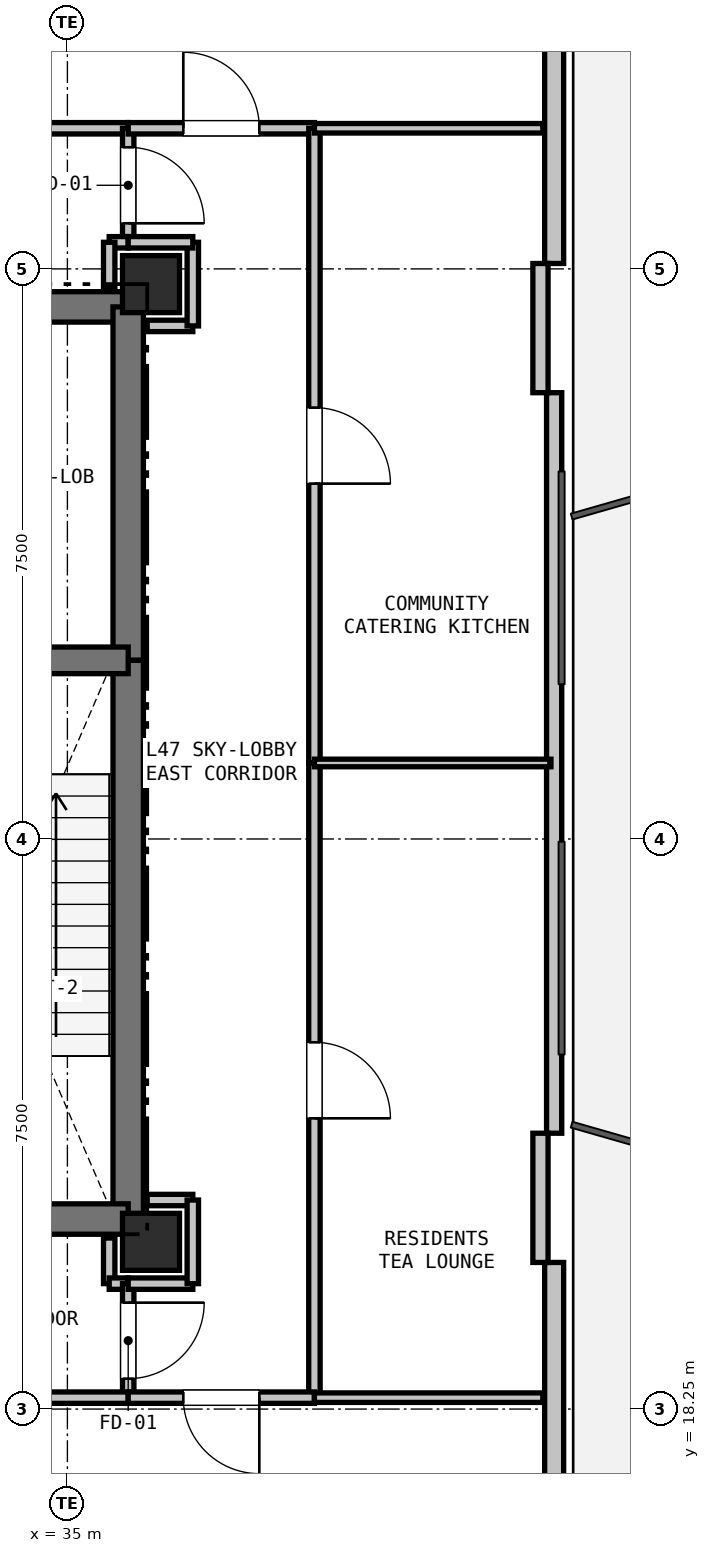
"""IFC4 building model, lengths in metres.
Left out: names, types, materials, properties, quantities, classifications, styles, units other than length and angle.
Written with IfcOpenShell. Run it as: python <this file> out.ifc"""

import sys

from ifc_helpers import new_model, si_unit, direction, frame, frame_2d, origin, origin_2d, place, context, subcontext, project, spatial, rectangle, extrude, element, fill, save


model = new_model("IFC4")
c1 = context("Model", 3, precision=1e-05, world=origin(), true_north=direction((0.0, 1.0)))
c2 = subcontext(c1, "Body", "Model", "MODEL_VIEW")
j1 = project(units=[si_unit("LENGTHUNIT", "METRE"), si_unit("PLANEANGLEUNIT", "RADIAN")], contexts=[c1])
p1 = place(None, origin())
s1 = spatial("IfcSite", under=j1, at=p1, CompositionType="ELEMENT")
p2 = place(p1, origin())
s2 = spatial("IfcBuilding", under=s1, at=p2, CompositionType="ELEMENT")
p3 = place(p2, frame((0.0, 0.0, 170.7)))
s3 = spatial("IfcBuildingStorey", under=s2, at=p3, CompositionType="ELEMENT", Elevation=170.7)
for number, where, z_axis, x_axis in (
    (1, (36.1, 33.05, 0.0), (0.0, 0.0, 1.0), (1.0, 0.0, 0.0)),
    (2, (36.1, 20.45, 0.0), (0.0, 0.0, 1.0), (1.0, 0.0, 0.0)),
):
    element("IfcColumn", number, at=place(p3, frame(where, z_axis=z_axis, x_axis=x_axis)), inside=s3, PredefinedType="COLUMN", context=c2, shape_type="SweptSolid", body=[
        extrude(rectangle(XDim=0.75, YDim=0.75, at=origin_2d()), origin(), (0.0, 0.0, 1.0), 4.8),
    ])
p4 = place(p3, frame((41.404, 43.764, 0.0), z_axis=(0.0, 0.0, 1.0), x_axis=(0.0, -1.0, 0.0)))
e3 = element("IfcWall", 3, at=p4, inside=s3, PredefinedType="SOLIDWALL", context=c2, shape_type="SweptSolid", body=[
    extrude(rectangle(XDim=10.442, YDim=0.25, at=frame_2d((5.221, 0.0))), origin(), (0.0, 0.0, 1.0), 3.205),
])
p5 = place(p4, frame((1.879, 0.0, 0.0)))
e4 = element("IfcOpeningElement", 4, at=p5, cuts=e3, PredefinedType="OPENING", context=c2, shape_type="SweptSolid", body=[
    extrude(rectangle(XDim=1.1, YDim=2.1, at=frame_2d((0.55, 1.05))), frame((0.0, 0.135, 0.0), z_axis=(0.0, -1.0, 0.0), x_axis=(1.0, 0.0, 0.0)), (0.0, 0.0, 1.0), 0.27),
])
p6 = place(p3, frame((41.404, 31.621, 0.0), z_axis=(0.0, 0.0, 1.0), x_axis=(0.0, -1.0, 0.0)))
e5 = element("IfcWall", 5, at=p6, inside=s3, PredefinedType="PARAPET", context=c2, shape_type="SweptSolid", body=[
    extrude(rectangle(XDim=9.742, YDim=0.2, at=frame_2d((4.871, 0.0))), origin(), (0.0, 0.0, 1.0), 0.2),
])
p7 = place(p3, frame((41.404, 20.179, 0.0), z_axis=(0.0, 0.0, 1.0), x_axis=(0.0, -1.0, 0.0)))
e6 = element("IfcWall", 6, at=p7, inside=s3, PredefinedType="SOLIDWALL", context=c2, shape_type="SweptSolid", body=[
    extrude(rectangle(XDim=10.442, YDim=0.25, at=frame_2d((5.221, 0.0))), origin(), (0.0, 0.0, 1.0), 3.205),
])
p8 = place(p7, frame((6.273, 0.0, 0.9)))
e7 = element("IfcOpeningElement", 7, at=p8, cuts=e6, PredefinedType="OPENING", context=c2, shape_type="SweptSolid", body=[
    extrude(rectangle(XDim=2.4, YDim=2.2, at=frame_2d((1.2, 1.1))), frame((0.0, 0.135, 0.0), z_axis=(0.0, -1.0, 0.0), x_axis=(1.0, 0.0, 0.0)), (0.0, 0.0, 1.0), 0.27),
])
for number, where, z_axis, x_axis in (
    (8, (41.224, 33.321, 0.0), (0.0, 0.0, 1.0), (0.0, -1.0, 0.0)),
    (9, (41.224, 21.879, 0.0), (0.0, 0.0, 1.0), (0.0, -1.0, 0.0)),
):
    element("IfcWall", number, at=place(p3, frame(where, z_axis=z_axis, x_axis=x_axis)), inside=s3, PredefinedType="PARAPET", context=c2, shape_type="SweptSolid", body=[
        extrude(rectangle(XDim=1.7, YDim=0.2, at=frame_2d((0.85, 0.0))), origin(), (0.0, 0.0, 1.0), 4.19),
    ])
p9 = place(p3, frame((32.35, 32.75, 0.0), z_axis=(0.0, 0.0, 1.0), x_axis=(1.0, 0.0, 0.0)))
e10 = element("IfcWall", 10, at=p9, inside=s3, PredefinedType="SHEAR", context=c2, shape_type="SweptSolid", body=[
    extrude(rectangle(XDim=3.45, YDim=0.4, at=frame_2d((1.725, 0.0))), origin(), (0.0, 0.0, 1.0), 4.57),
])
p10 = place(p9, frame((0.65, 0.0, 0.0)))
e11 = element("IfcOpeningElement", 11, at=p10, cuts=e10, PredefinedType="OPENING", context=c2, shape_type="SweptSolid", body=[
    extrude(rectangle(XDim=1.15, YDim=2.15, at=frame_2d((0.575, 1.075))), frame((0.0, 0.21, 0.0), z_axis=(0.0, -1.0, 0.0), x_axis=(1.0, 0.0, 0.0)), (0.0, 0.0, 1.0), 0.42),
])
p11 = place(p3, frame((35.8, 32.75, 0.0), z_axis=(0.0, 0.0, 1.0), x_axis=(0.0, -1.0, 0.0)))
e12 = element("IfcWall", 12, at=p11, inside=s3, PredefinedType="SHEAR", context=c2, shape_type="SweptSolid", body=[
    extrude(rectangle(XDim=4.65, YDim=0.4, at=frame_2d((2.325, 0.0))), origin(), (0.0, 0.0, 1.0), 4.57),
])
p12 = place(p3, frame((35.8, 28.1, 0.0), z_axis=(0.0, 0.0, 1.0), x_axis=(0.0, -1.0, 0.0)))
e13 = element("IfcWall", 13, at=p12, inside=s3, PredefinedType="SHEAR", context=c2, shape_type="SweptSolid", body=[
    extrude(rectangle(XDim=7.35, YDim=0.4, at=frame_2d((3.675, 0.0))), origin(), (0.0, 0.0, 1.0), 4.57),
])
p13 = place(p3, frame((35.8, 20.75, 0.0), z_axis=(0.0, 0.0, 1.0), x_axis=(-1.0, 0.0, 0.0)))
e14 = element("IfcWall", 14, at=p13, inside=s3, PredefinedType="SHEAR", context=c2, shape_type="SweptSolid", body=[
    extrude(rectangle(XDim=3.45, YDim=0.4, at=frame_2d((1.725, 0.0))), origin(), (0.0, 0.0, 1.0), 4.57),
])
p14 = place(p3, frame((32.35, 28.1, 0.0), z_axis=(0.0, 0.0, 1.0), x_axis=(1.0, 0.0, 0.0)))
e15 = element("IfcWall", 15, at=p14, inside=s3, PredefinedType="SHEAR", context=c2, shape_type="SweptSolid", body=[
    extrude(rectangle(XDim=3.45, YDim=0.35, at=frame_2d((1.725, 0.0))), origin(), (0.0, 0.0, 1.0), 4.57),
])
p15 = place(p14, frame((1.15, 0.0, 0.0)))
e16 = element("IfcOpeningElement", 16, at=p15, cuts=e15, PredefinedType="OPENING", context=c2, shape_type="SweptSolid", body=[
    extrude(rectangle(XDim=1.15, YDim=2.15, at=frame_2d((0.575, 1.075))), frame((0.0, 0.185, 0.0), z_axis=(0.0, -1.0, 0.0), x_axis=(1.0, 0.0, 0.0)), (0.0, 0.0, 1.0), 0.37),
])
p16 = place(p3, frame((35.55, 20.5, 0.0), z_axis=(0.0, 0.0, 1.0), x_axis=(0.0, -1.0, 0.0)))
e17 = element("IfcWall", 17, at=p16, inside=s3, PredefinedType="PARTITIONING", context=c2, shape_type="SweptSolid", body=[
    extrude(rectangle(XDim=0.6, YDim=0.15, at=frame_2d((0.3, 0.0))), origin(), (0.0, 0.0, 1.0), 4.095),
])
p17 = place(p3, frame((35.55, 19.9, 0.0), z_axis=(0.0, 0.0, 1.0), x_axis=(1.0, 0.0, 0.0)))
e18 = element("IfcWall", 18, at=p17, inside=s3, PredefinedType="PARTITIONING", context=c2, shape_type="SweptSolid", body=[
    extrude(rectangle(XDim=0.25, YDim=0.15, at=frame_2d((0.125, 0.0))), origin(), (0.0, 0.0, 1.0), 4.57),
])
p18 = place(p3, frame((35.8, 19.9, 0.0), z_axis=(0.0, 0.0, 1.0), x_axis=(0.0, -1.0, 0.0)))
e19 = element("IfcWall", 19, at=p18, inside=s3, PredefinedType="PARTITIONING", context=c2, shape_type="SweptSolid", body=[
    extrude(rectangle(XDim=1.5, YDim=0.15, at=frame_2d((0.75, 0.0))), origin(), (0.0, 0.0, 1.0), 3.205),
])
p19 = place(p18, frame((0.25, 0.0, 0.0)))
e20 = element("IfcOpeningElement", 20, at=p19, cuts=e19, PredefinedType="OPENING", context=c2, shape_type="SweptSolid", body=[
    extrude(rectangle(XDim=1.0, YDim=2.15, at=frame_2d((0.5, 1.075))), frame((0.0, 0.085, 0.0), z_axis=(0.0, -1.0, 0.0), x_axis=(1.0, 0.0, 0.0)), (0.0, 0.0, 1.0), 0.17),
])
p20 = place(p3, frame((35.8, 18.4, 0.0), z_axis=(0.0, 0.0, 1.0), x_axis=(-1.0, 0.0, 0.0)))
e21 = element("IfcWall", 21, at=p20, inside=s3, PredefinedType="PARTITIONING", context=c2, shape_type="SweptSolid", body=[
    extrude(rectangle(XDim=8.8, YDim=0.15, at=frame_2d((4.4, 0.0))), origin(), (0.0, 0.0, 1.0), 3.205),
])
p21 = place(p20, frame((3.9, 0.0, 0.0)))
e22 = element("IfcOpeningElement", 22, at=p21, cuts=e21, PredefinedType="OPENING", context=c2, shape_type="SweptSolid", body=[
    extrude(rectangle(XDim=1.0, YDim=2.15, at=frame_2d((0.5, 1.075))), frame((0.0, 0.085, 0.0), z_axis=(0.0, -1.0, 0.0), x_axis=(1.0, 0.0, 0.0)), (0.0, 0.0, 1.0), 0.17),
])
p22 = place(p3, frame((29.5, 35.1, 0.0), z_axis=(0.0, 0.0, 1.0), x_axis=(1.0, 0.0, 0.0)))
e23 = element("IfcWall", 23, at=p22, inside=s3, PredefinedType="PARTITIONING", context=c2, shape_type="SweptSolid", body=[
    extrude(rectangle(XDim=6.3, YDim=0.15, at=frame_2d((3.15, 0.0))), origin(), (0.0, 0.0, 1.0), 3.205),
])
p23 = place(p22, frame((2.25, 0.0, 0.0)))
e24 = element("IfcOpeningElement", 24, at=p23, cuts=e23, PredefinedType="OPENING", context=c2, shape_type="SweptSolid", body=[
    extrude(rectangle(XDim=1.8, YDim=2.2, at=frame_2d((0.9, 1.1))), frame((0.0, 0.085, 0.0), z_axis=(0.0, -1.0, 0.0), x_axis=(1.0, 0.0, 0.0)), (0.0, 0.0, 1.0), 0.17),
])
p24 = place(p3, frame((35.8, 35.1, 0.0), z_axis=(0.0, 0.0, 1.0), x_axis=(0.0, -1.0, 0.0)))
e25 = element("IfcWall", 25, at=p24, inside=s3, PredefinedType="PARTITIONING", context=c2, shape_type="SweptSolid", body=[
    extrude(rectangle(XDim=1.5, YDim=0.15, at=frame_2d((0.75, 0.0))), origin(), (0.0, 0.0, 1.0), 3.205),
])
p25 = place(p24, frame((0.25, 0.0, 0.0)))
e26 = element("IfcOpeningElement", 26, at=p25, cuts=e25, PredefinedType="OPENING", context=c2, shape_type="SweptSolid", body=[
    extrude(rectangle(XDim=1.0, YDim=2.15, at=frame_2d((0.5, 1.075))), frame((0.0, 0.085, 0.0), z_axis=(0.0, -1.0, 0.0), x_axis=(1.0, 0.0, 0.0)), (0.0, 0.0, 1.0), 0.17),
])
p26 = place(p3, frame((35.8, 33.6, 0.0), z_axis=(0.0, 0.0, 1.0), x_axis=(-1.0, 0.0, 0.0)))
e27 = element("IfcWall", 27, at=p26, inside=s3, PredefinedType="PARTITIONING", context=c2, shape_type="SweptSolid", body=[
    extrude(rectangle(XDim=0.25, YDim=0.15, at=frame_2d((0.125, 0.0))), origin(), (0.0, 0.0, 1.0), 3.205),
])
p27 = place(p3, frame((35.55, 33.6, 0.0), z_axis=(0.0, 0.0, 1.0), x_axis=(0.0, -1.0, 0.0)))
e28 = element("IfcWall", 28, at=p27, inside=s3, PredefinedType="PARTITIONING", context=c2, shape_type="SweptSolid", body=[
    extrude(rectangle(XDim=0.6, YDim=0.15, at=frame_2d((0.3, 0.0))), origin(), (0.0, 0.0, 1.0), 3.205),
])
for number, where, z_axis, x_axis in (
    (29, (36.65, 21.0, 0.0), (0.0, 0.0, 1.0), (-1.0, 0.0, 0.0)),
    (30, (36.05, 32.5, 0.0), (0.0, 0.0, 1.0), (1.0, 0.0, 0.0)),
):
    element("IfcWall", number, at=place(p3, frame(where, z_axis=z_axis, x_axis=x_axis)), inside=s3, PredefinedType="PARTITIONING", context=c2, shape_type="SweptSolid", body=[
        extrude(rectangle(XDim=0.6, YDim=0.15, at=frame_2d((0.3, 0.0))), origin(), (0.0, 0.0, 1.0), 4.095),
    ])
p28 = place(p3, frame((36.65, 32.5, 0.0), z_axis=(0.0, 0.0, 1.0), x_axis=(0.0, 1.0, 0.0)))
e31 = element("IfcWall", 31, at=p28, inside=s3, PredefinedType="PARTITIONING", context=c2, shape_type="SweptSolid", body=[
    extrude(rectangle(XDim=1.1, YDim=0.15, at=frame_2d((0.55, 0.0))), origin(), (0.0, 0.0, 1.0), 3.205),
])
p29 = place(p3, frame((36.65, 33.6, 0.0), z_axis=(0.0, 0.0, 1.0), x_axis=(-1.0, 0.0, 0.0)))
e32 = element("IfcWall", 32, at=p29, inside=s3, PredefinedType="PARTITIONING", context=c2, shape_type="SweptSolid", body=[
    extrude(rectangle(XDim=0.85, YDim=0.15, at=frame_2d((0.425, 0.0))), origin(), (0.0, 0.0, 1.0), 3.205),
])
p30 = place(p3, frame((35.8, 35.1, 0.0), z_axis=(0.0, 0.0, 1.0), x_axis=(1.0, 0.0, 0.0)))
e33 = element("IfcWall", 33, at=p30, inside=s3, PredefinedType="PARTITIONING", context=c2, shape_type="SweptSolid", body=[
    extrude(rectangle(XDim=2.45, YDim=0.15, at=frame_2d((1.225, 0.0))), origin(), (0.0, 0.0, 1.0), 3.205),
])
p31 = place(p30, frame((0.725, 0.0, 0.0)))
e34 = element("IfcOpeningElement", 34, at=p31, cuts=e33, PredefinedType="OPENING", context=c2, shape_type="SweptSolid", body=[
    extrude(rectangle(XDim=1.0, YDim=2.15, at=frame_2d((0.5, 1.075))), frame((0.0, 0.085, 0.0), z_axis=(0.0, -1.0, 0.0), x_axis=(1.0, 0.0, 0.0)), (0.0, 0.0, 1.0), 0.17),
])
p32 = place(p3, frame((38.25, 35.1, 0.0), z_axis=(0.0, 0.0, 1.0), x_axis=(0.0, -1.0, 0.0)))
e35 = element("IfcWall", 35, at=p32, inside=s3, PredefinedType="PARTITIONING", context=c2, shape_type="SweptSolid", body=[
    extrude(rectangle(XDim=8.35, YDim=0.15, at=frame_2d((4.175, 0.0))), origin(), (0.0, 0.0, 1.0), 3.205),
])
p33 = place(p32, frame((3.675, 0.0, 0.0)))
e36 = element("IfcOpeningElement", 36, at=p33, cuts=e35, PredefinedType="OPENING", context=c2, shape_type="SweptSolid", body=[
    extrude(rectangle(XDim=1.0, YDim=2.15, at=frame_2d((0.5, 1.075))), frame((0.0, 0.085, 0.0), z_axis=(0.0, -1.0, 0.0), x_axis=(1.0, 0.0, 0.0)), (0.0, 0.0, 1.0), 0.17),
])
p34 = place(p3, frame((38.25, 26.75, 0.0), z_axis=(0.0, 0.0, 1.0), x_axis=(0.0, -1.0, 0.0)))
e37 = element("IfcWall", 37, at=p34, inside=s3, PredefinedType="PARTITIONING", context=c2, shape_type="SweptSolid", body=[
    extrude(rectangle(XDim=8.35, YDim=0.15, at=frame_2d((4.175, 0.0))), origin(), (0.0, 0.0, 1.0), 4.57),
])
p35 = place(p34, frame((3.675, 0.0, 0.0)))
e38 = element("IfcOpeningElement", 38, at=p35, cuts=e37, PredefinedType="OPENING", context=c2, shape_type="SweptSolid", body=[
    extrude(rectangle(XDim=1.0, YDim=2.15, at=frame_2d((0.5, 1.075))), frame((0.0, 0.085, 0.0), z_axis=(0.0, -1.0, 0.0), x_axis=(1.0, 0.0, 0.0)), (0.0, 0.0, 1.0), 0.17),
])
p36 = place(p3, frame((38.25, 18.4, 0.0), z_axis=(0.0, 0.0, 1.0), x_axis=(-1.0, 0.0, 0.0)))
e39 = element("IfcWall", 39, at=p36, inside=s3, PredefinedType="PARTITIONING", context=c2, shape_type="SweptSolid", body=[
    extrude(rectangle(XDim=2.45, YDim=0.15, at=frame_2d((1.225, 0.0))), origin(), (0.0, 0.0, 1.0), 3.205),
])
p37 = place(p36, frame((0.725, 0.0, 0.0)))
e40 = element("IfcOpeningElement", 40, at=p37, cuts=e39, PredefinedType="OPENING", context=c2, shape_type="SweptSolid", body=[
    extrude(rectangle(XDim=1.0, YDim=2.15, at=frame_2d((0.5, 1.075))), frame((0.0, 0.085, 0.0), z_axis=(0.0, -1.0, 0.0), x_axis=(1.0, 0.0, 0.0)), (0.0, 0.0, 1.0), 0.17),
])
p38 = place(p3, frame((35.8, 19.9, 0.0), z_axis=(0.0, 0.0, 1.0), x_axis=(1.0, 0.0, 0.0)))
e41 = element("IfcWall", 41, at=p38, inside=s3, PredefinedType="PARTITIONING", context=c2, shape_type="SweptSolid", body=[
    extrude(rectangle(XDim=0.85, YDim=0.15, at=frame_2d((0.425, 0.0))), origin(), (0.0, 0.0, 1.0), 4.57),
])
p39 = place(p3, frame((36.65, 19.9, 0.0), z_axis=(0.0, 0.0, 1.0), x_axis=(0.0, 1.0, 0.0)))
e42 = element("IfcWall", 42, at=p39, inside=s3, PredefinedType="PARTITIONING", context=c2, shape_type="SweptSolid", body=[
    extrude(rectangle(XDim=1.1, YDim=0.15, at=frame_2d((0.55, 0.0))), origin(), (0.0, 0.0, 1.0), 4.57),
])
p40 = place(p3, frame((38.25, 35.1, 0.0), z_axis=(0.0, 0.0, 1.0), x_axis=(1.0, 0.0, 0.0)))
e43 = element("IfcWall", 43, at=p40, inside=s3, PredefinedType="PARTITIONING", context=c2, shape_type="SweptSolid", body=[
    extrude(rectangle(XDim=3.005, YDim=0.125, at=frame_2d((1.502, 0.0))), origin(), (0.0, 0.0, 1.0), 2.365),
])
p41 = place(p3, frame((41.362, 26.75, 0.0), z_axis=(0.0, 0.0, 1.0), x_axis=(-1.0, 0.0, 0.0)))
e44 = element("IfcWall", 44, at=p41, inside=s3, PredefinedType="PARTITIONING", context=c2, shape_type="SweptSolid", body=[
    extrude(rectangle(XDim=3.112, YDim=0.1, at=frame_2d((1.556, 0.0))), origin(), (0.0, 0.0, 1.0), 2.365),
])
p42 = place(p3, frame((41.255, 18.4, 0.0), z_axis=(0.0, 0.0, 1.0), x_axis=(-1.0, 0.0, 0.0)))
e45 = element("IfcWall", 45, at=p42, inside=s3, PredefinedType="PARTITIONING", context=c2, shape_type="SweptSolid", body=[
    extrude(rectangle(XDim=3.005, YDim=0.125, at=frame_2d((1.502, 0.0))), origin(), (0.0, 0.0, 1.0), 2.365),
])
p43 = place(p19, origin())
e46 = element("IfcDoor", 46, at=p43, inside=s3, OperationType="SINGLE_SWING_LEFT", PredefinedType="DOOR", context=c2, shape_type="SweptSolid", body=[
    extrude(rectangle(XDim=1.0, YDim=2.15, at=frame_2d((0.5, 1.075))), frame((0.0, 0.025, 0.0), z_axis=(0.0, -1.0, 0.0), x_axis=(1.0, 0.0, 0.0)), (0.0, 0.0, 1.0), 0.05),
])
fill(e20, e46)
p44 = place(p25, origin())
e47 = element("IfcDoor", 47, at=p44, inside=s3, OperationType="SINGLE_SWING_RIGHT", PredefinedType="DOOR", context=c2, shape_type="SweptSolid", body=[
    extrude(rectangle(XDim=1.0, YDim=2.15, at=frame_2d((0.5, 1.075))), frame((0.0, 0.025, 0.0), z_axis=(0.0, -1.0, 0.0), x_axis=(1.0, 0.0, 0.0)), (0.0, 0.0, 1.0), 0.05),
])
fill(e26, e47)
p45 = place(p33, origin())
e48 = element("IfcDoor", 48, at=p45, inside=s3, OperationType="SINGLE_SWING_RIGHT", PredefinedType="DOOR", context=c2, shape_type="SweptSolid", body=[
    extrude(rectangle(XDim=1.0, YDim=2.15, at=frame_2d((0.5, 1.075))), frame((0.0, 0.025, 0.0), z_axis=(0.0, -1.0, 0.0), x_axis=(1.0, 0.0, 0.0)), (0.0, 0.0, 1.0), 0.05),
])
fill(e36, e48)
p46 = place(p31, origin())
e49 = element("IfcDoor", 49, at=p46, inside=s3, OperationType="SINGLE_SWING_LEFT", PredefinedType="DOOR", context=c2, shape_type="SweptSolid", body=[
    extrude(rectangle(XDim=1.0, YDim=2.15, at=frame_2d((0.5, 1.075))), frame((0.0, 0.025, 0.0), z_axis=(0.0, -1.0, 0.0), x_axis=(1.0, 0.0, 0.0)), (0.0, 0.0, 1.0), 0.05),
])
fill(e34, e49)
p47 = place(p35, origin())
e50 = element("IfcDoor", 50, at=p47, inside=s3, OperationType="SINGLE_SWING_RIGHT", PredefinedType="DOOR", context=c2, shape_type="SweptSolid", body=[
    extrude(rectangle(XDim=1.0, YDim=2.15, at=frame_2d((0.5, 1.075))), frame((0.0, 0.025, 0.0), z_axis=(0.0, -1.0, 0.0), x_axis=(1.0, 0.0, 0.0)), (0.0, 0.0, 1.0), 0.05),
])
fill(e38, e50)
p48 = place(p37, origin())
e51 = element("IfcDoor", 51, at=p48, inside=s3, OperationType="SINGLE_SWING_LEFT", PredefinedType="DOOR", context=c2, shape_type="SweptSolid", body=[
    extrude(rectangle(XDim=1.0, YDim=2.15, at=frame_2d((0.5, 1.075))), frame((0.0, 0.025, 0.0), z_axis=(0.0, -1.0, 0.0), x_axis=(1.0, 0.0, 0.0)), (0.0, 0.0, 1.0), 0.05),
])
fill(e40, e51)
save(model, sys.argv[1])
